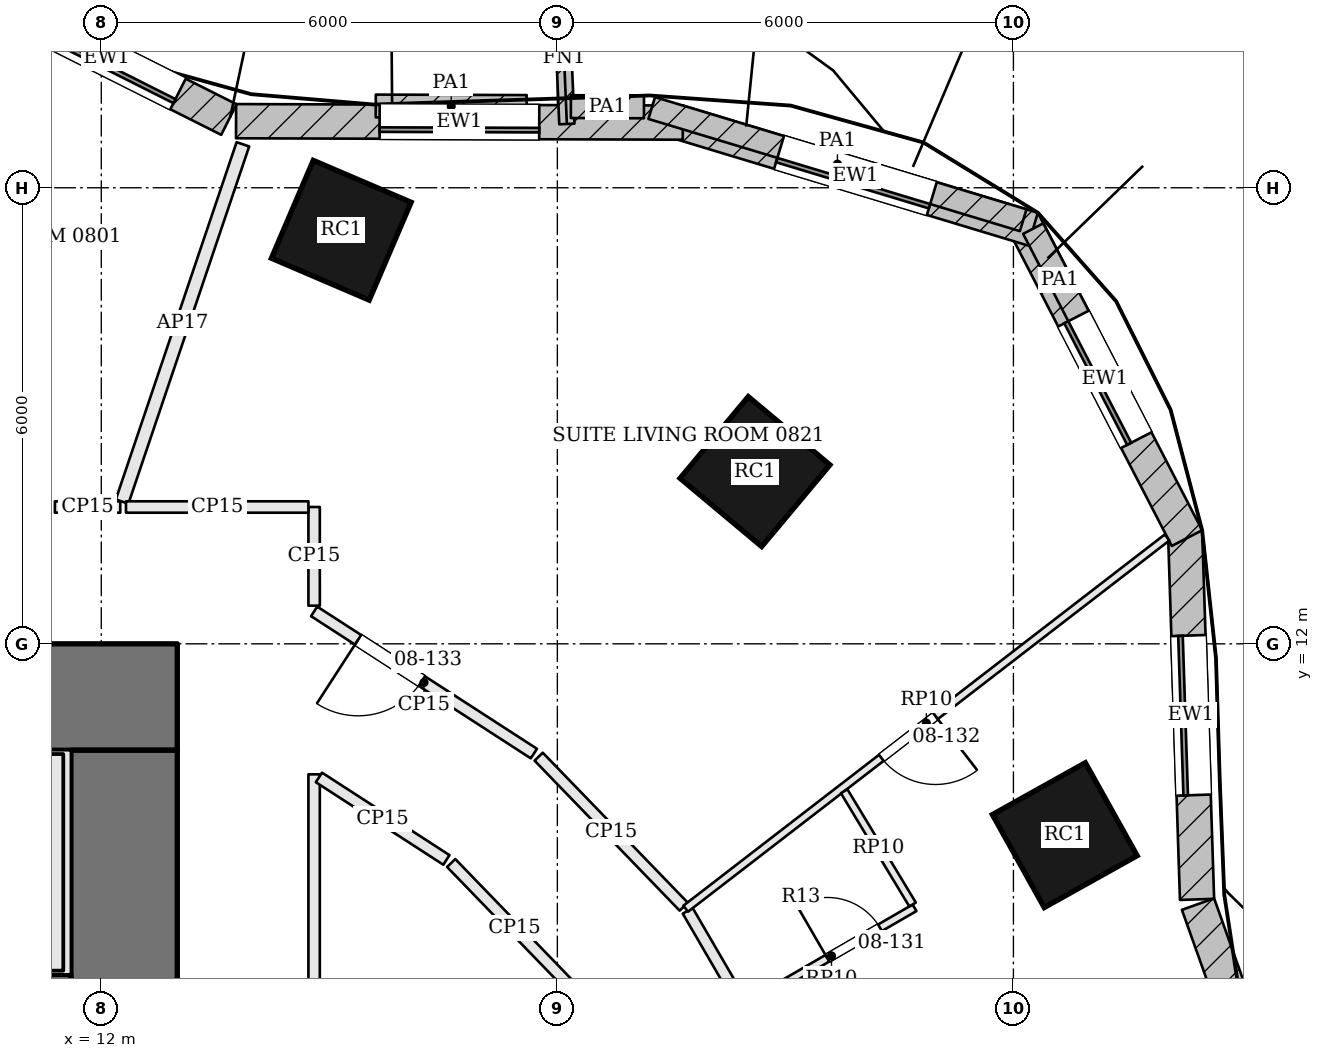
"""IFC4 building model, lengths in metres.
Left out: names, types, materials, properties, quantities, classifications, styles, units other than length and angle.
Written with IfcOpenShell. Run it as: python <this file> out.ifc"""

import sys

from ifc_helpers import new_model, si_unit, direction, frame, frame_2d, origin, origin_2d, place, context, subcontext, project, spatial, rectangle, extrude, element, fill, save


model = new_model("IFC4")
c1 = context("Model", 3, precision=1e-05, world=origin(), true_north=direction((0.0, 1.0)))
c2 = subcontext(c1, "Body", "Model", "MODEL_VIEW")
j1 = project(units=[si_unit("LENGTHUNIT", "METRE"), si_unit("PLANEANGLEUNIT", "RADIAN")], contexts=[c1])
p1 = place(None, origin())
s1 = spatial("IfcSite", under=j1, at=p1, CompositionType="ELEMENT")
p2 = place(p1, origin())
s2 = spatial("IfcBuilding", under=s1, at=p2, CompositionType="ELEMENT")
p3 = place(p2, frame((0.0, 0.0, 44.7)))
s3 = spatial("IfcBuildingStorey", under=s2, at=p3, CompositionType="ELEMENT", Elevation=44.7)
p4 = place(p3, frame((-13.0, 11.3, 0.0), z_axis=(0.0, 0.0, 1.0), x_axis=(1.0, 0.0, 0.0)))
e1 = element("IfcWall", 1, at=p4, inside=s3, PredefinedType="SHEAR", context=c2, shape_type="SweptSolid", body=[
    extrude(rectangle(XDim=26.0, YDim=1.4, at=frame_2d((13.0, 0.0))), origin(), (0.0, 0.0, 1.0), 3.6),
])
p5 = place(p4, frame((8.825, 0.0, 0.0)))
e2 = element("IfcOpeningElement", 2, at=p5, cuts=e1, PredefinedType="OPENING", context=c2, shape_type="SweptSolid", body=[
    extrude(rectangle(XDim=1.0, YDim=2.1, at=frame_2d((0.5, 1.05))), frame((0.0, 0.71, 0.0), z_axis=(0.0, -1.0, 0.0), x_axis=(1.0, 0.0, 0.0)), (0.0, 0.0, 1.0), 1.42),
])
p6 = place(p4, frame((11.275, 0.0, 0.0)))
e3 = element("IfcOpeningElement", 3, at=p6, cuts=e1, PredefinedType="OPENING", context=c2, shape_type="SweptSolid", body=[
    extrude(rectangle(XDim=1.0, YDim=2.1, at=frame_2d((0.5, 1.05))), frame((0.0, 0.71, 0.0), z_axis=(0.0, -1.0, 0.0), x_axis=(1.0, 0.0, 0.0)), (0.0, 0.0, 1.0), 1.42),
])
p7 = place(p4, frame((14.125, 0.0, 0.0)))
e4 = element("IfcOpeningElement", 4, at=p7, cuts=e1, PredefinedType="OPENING", context=c2, shape_type="SweptSolid", body=[
    extrude(rectangle(XDim=1.0, YDim=2.1, at=frame_2d((0.5, 1.05))), frame((0.0, 0.71, 0.0), z_axis=(0.0, -1.0, 0.0), x_axis=(1.0, 0.0, 0.0)), (0.0, 0.0, 1.0), 1.42),
])
p8 = place(p4, frame((16.725, 0.0, 0.0)))
e5 = element("IfcOpeningElement", 5, at=p8, cuts=e1, PredefinedType="OPENING", context=c2, shape_type="SweptSolid", body=[
    extrude(rectangle(XDim=0.7, YDim=2.1, at=frame_2d((0.35, 1.05))), frame((0.0, 0.71, 0.0), z_axis=(0.0, -1.0, 0.0), x_axis=(1.0, 0.0, 0.0)), (0.0, 0.0, 1.0), 1.42),
])
p9 = place(p3, frame((12.3, -1.6, 0.0), z_axis=(0.0, 0.0, 1.0), x_axis=(0.0, 1.0, 0.0)))
e6 = element("IfcWall", 6, at=p9, inside=s3, PredefinedType="SHEAR", context=c2, shape_type="SweptSolid", body=[
    extrude(rectangle(XDim=12.2, YDim=1.4, at=frame_2d((6.1, 0.0))), origin(), (0.0, 0.0, 1.0), 3.6),
])
p10 = place(p9, frame((6.8, 0.0, 0.0)))
e7 = element("IfcOpeningElement", 7, at=p10, cuts=e6, PredefinedType="OPENING", context=c2, shape_type="SweptSolid", body=[
    extrude(rectangle(XDim=1.8, YDim=2.1, at=frame_2d((0.9, 1.05))), frame((0.0, 0.71, 0.0), z_axis=(0.0, -1.0, 0.0), x_axis=(1.0, 0.0, 0.0)), (0.0, 0.0, 1.0), 1.42),
])
for number, where, z_axis, x_axis in (
    (8, (24.676, 9.483, 0.0), (0.0, 0.0, 1.0), (-0.487, 0.873, 0.0)),
    (9, (20.6, 14.266, 0.0), (0.0, 0.0, 1.0), (-0.767, 0.641, 0.0)),
    (10, (15.157, 17.441, 0.0), (0.0, 0.0, 1.0), (-0.919, 0.394, 0.0)),
):
    element("IfcColumn", number, at=place(p3, frame(where, z_axis=z_axis, x_axis=x_axis)), inside=s3, PredefinedType="COLUMN", context=c2, shape_type="SweptSolid", body=[
        extrude(rectangle(XDim=1.4, YDim=1.4, at=origin_2d()), origin(), (0.0, 0.0, 1.0), 3.6),
    ])
p11 = place(p3, frame((27.933, 4.356, 0.0), z_axis=(0.0, 0.0, 1.0), x_axis=(-0.335746005454, 0.941952557097, 0.0)))
e11 = element("IfcWall", 11, at=p11, inside=s3, PredefinedType="SOLIDWALL", context=c2, shape_type="SweptSolid", body=[
    extrude(rectangle(XDim=4.48, YDim=0.45, at=frame_2d((2.24, 0.0))), origin(), (0.0, 0.0, 1.0), 3.4),
])
p12 = place(p11, frame((1.19, 0.0, 0.9)))
e12 = element("IfcOpeningElement", 12, at=p12, cuts=e11, PredefinedType="OPENING", context=c2, shape_type="SweptSolid", body=[
    extrude(rectangle(XDim=2.1, YDim=2.0, at=frame_2d((1.05, 1.0))), frame((0.0, 0.235, 0.0), z_axis=(0.0, -1.0, 0.0), x_axis=(1.0, 0.0, 0.0)), (0.0, 0.0, 1.0), 0.47),
])
p13 = place(p3, frame((26.416, 8.638, 0.0), z_axis=(0.0, 0.0, 1.0), x_axis=(-0.03254979302, 0.999470115098, 0.0)))
e13 = element("IfcWall", 13, at=p13, inside=s3, PredefinedType="SOLIDWALL", context=c2, shape_type="SweptSolid", body=[
    extrude(rectangle(XDim=4.845, YDim=0.45, at=frame_2d((2.423, 0.0))), origin(), (0.0, 0.0, 1.0), 3.4),
])
p14 = place(p13, frame((1.373, 0.0, 0.9)))
e14 = element("IfcOpeningElement", 14, at=p14, cuts=e13, PredefinedType="OPENING", context=c2, shape_type="SweptSolid", body=[
    extrude(rectangle(XDim=2.1, YDim=2.0, at=frame_2d((1.05, 1.0))), frame((0.0, 0.235, 0.0), z_axis=(0.0, -1.0, 0.0), x_axis=(1.0, 0.0, 0.0)), (0.0, 0.0, 1.0), 0.47),
])
p15 = place(p3, frame((26.283, 13.391, 0.0), z_axis=(0.0, 0.0, 1.0), x_axis=(-0.459485057932, 0.888185499509, 0.0)))
e15 = element("IfcWall", 15, at=p15, inside=s3, PredefinedType="SOLIDWALL", context=c2, shape_type="SweptSolid", body=[
    extrude(rectangle(XDim=4.703, YDim=0.45, at=frame_2d((2.352, 0.0))), origin(), (0.0, 0.0, 1.0), 3.4),
])
p16 = place(p15, frame((1.451, 0.0, 0.9)))
e16 = element("IfcOpeningElement", 16, at=p16, cuts=e15, PredefinedType="OPENING", context=c2, shape_type="SweptSolid", body=[
    extrude(rectangle(XDim=1.8, YDim=2.0, at=frame_2d((0.9, 1.0))), frame((0.0, 0.235, 0.0), z_axis=(0.0, -1.0, 0.0), x_axis=(1.0, 0.0, 0.0)), (0.0, 0.0, 1.0), 0.47),
])
p17 = place(p3, frame((24.257, 17.456, 0.0), z_axis=(0.0, 0.0, 1.0), x_axis=(-0.957268138294, 0.289201852359, 0.0)))
e17 = element("IfcWall", 17, at=p17, inside=s3, PredefinedType="SOLIDWALL", context=c2, shape_type="SweptSolid", body=[
    extrude(rectangle(XDim=4.879, YDim=0.45, at=frame_2d((2.44, 0.0))), origin(), (0.0, 0.0, 1.0), 3.4),
])
p18 = place(p17, frame((1.39, 0.0, 0.9)))
e18 = element("IfcOpeningElement", 18, at=p18, cuts=e17, PredefinedType="OPENING", context=c2, shape_type="SweptSolid", body=[
    extrude(rectangle(XDim=2.1, YDim=2.0, at=frame_2d((1.05, 1.0))), frame((0.0, 0.235, 0.0), z_axis=(0.0, -1.0, 0.0), x_axis=(1.0, 0.0, 0.0)), (0.0, 0.0, 1.0), 0.47),
])
p19 = place(p3, frame((19.65, 18.857, 0.0), z_axis=(0.0, 0.0, 1.0), x_axis=(-0.999994750773, 0.003240127552, 0.0)))
e19 = element("IfcWall", 19, at=p19, inside=s3, PredefinedType="SOLIDWALL", context=c2, shape_type="SweptSolid", body=[
    extrude(rectangle(XDim=5.877, YDim=0.45, at=frame_2d((2.938, 0.0))), origin(), (0.0, 0.0, 1.0), 3.4),
])
p20 = place(p19, frame((1.889, 0.0, 0.9)))
e20 = element("IfcOpeningElement", 20, at=p20, cuts=e19, PredefinedType="OPENING", context=c2, shape_type="SweptSolid", body=[
    extrude(rectangle(XDim=2.1, YDim=2.0, at=frame_2d((1.05, 1.0))), frame((0.0, 0.235, 0.0), z_axis=(0.0, -1.0, 0.0), x_axis=(1.0, 0.0, 0.0)), (0.0, 0.0, 1.0), 0.47),
])
p21 = place(p3, frame((13.679, 18.897, 0.0), z_axis=(0.0, 0.0, 1.0), x_axis=(-0.893502471356, 0.449058274259, 0.0)))
e21 = element("IfcWall", 21, at=p21, inside=s3, PredefinedType="SOLIDWALL", context=c2, shape_type="SweptSolid", body=[
    extrude(rectangle(XDim=3.598, YDim=0.45, at=frame_2d((1.799, 0.0))), origin(), (0.0, 0.0, 1.0), 3.4),
])
p22 = place(p21, frame((0.749, 0.0, 0.9)))
e22 = element("IfcOpeningElement", 22, at=p22, cuts=e21, PredefinedType="OPENING", context=c2, shape_type="SweptSolid", body=[
    extrude(rectangle(XDim=2.1, YDim=2.0, at=frame_2d((1.05, 1.0))), frame((0.0, 0.235, 0.0), z_axis=(0.0, -1.0, 0.0), x_axis=(1.0, 0.0, 0.0)), (0.0, 0.0, 1.0), 0.47),
])
p23 = place(p3, frame((18.125, 18.839, 0.0), z_axis=(0.0, 0.0, 1.0), x_axis=(-0.042274699855, 0.999106025281, 0.0)))
e23 = element("IfcWall", 23, at=p23, inside=s3, PredefinedType="SOLIDWALL", context=c2, shape_type="SweptSolid", body=[
    extrude(rectangle(XDim=1.75, YDim=0.2, at=frame_2d((0.875, 0.0))), origin(), (0.0, 0.0, 1.0), 3.4),
])
p24 = place(p3, frame((24.965, 16.101, 3.6), z_axis=(0.0, 0.0, 1.0), x_axis=(-0.459461897951, 0.88819748048, 0.0)))
e24 = element("IfcWall", 24, at=p24, inside=s3, PredefinedType="PARAPET", context=c2, shape_type="SweptSolid", body=[
    extrude(rectangle(XDim=1.533, YDim=0.3, at=frame_2d((0.767, 0.0))), origin(), (0.0, 0.0, 1.0), 1.1),
])
p25 = place(p3, frame((24.128, 17.573, 3.6), z_axis=(0.0, 0.0, 1.0), x_axis=(-0.95727702005, 0.289172451806, 0.0)))
e25 = element("IfcWall", 25, at=p25, inside=s3, PredefinedType="PARAPET", context=c2, shape_type="SweptSolid", body=[
    extrude(rectangle(XDim=5.105, YDim=0.3, at=frame_2d((2.553, 0.0))), origin(), (0.0, 0.0, 1.0), 1.1),
])
p26 = place(p3, frame((19.14, 19.064, 3.6), z_axis=(0.0, 0.0, 1.0), x_axis=(-0.999994556719, 0.003299474426, 0.0)))
e26 = element("IfcWall", 26, at=p26, inside=s3, PredefinedType="PARAPET", context=c2, shape_type="SweptSolid", body=[
    extrude(rectangle(XDim=0.962, YDim=0.3, at=frame_2d((0.481, 0.0))), origin(), (0.0, 0.0, 1.0), 1.1),
])
p27 = place(p3, frame((17.596, 19.069, 3.6), z_axis=(0.0, 0.0, 1.0), x_axis=(-0.999994488127, 0.003320198128, 0.0)))
e27 = element("IfcWall", 27, at=p27, inside=s3, PredefinedType="PARAPET", context=c2, shape_type="SweptSolid", body=[
    extrude(rectangle(XDim=1.985, YDim=0.3, at=frame_2d((0.993, 0.0))), origin(), (0.0, 0.0, 1.0), 1.1),
])
p28 = place(p3, frame((11.6, 7.525, 0.0), z_axis=(0.0, 0.0, 1.0), x_axis=(-1.0, 0.0, 0.0)))
e28 = element("IfcWall", 28, at=p28, inside=s3, PredefinedType="SOLIDWALL", context=c2, shape_type="SweptSolid", body=[
    extrude(rectangle(XDim=6.5, YDim=0.25, at=frame_2d((3.25, 0.0))), origin(), (0.0, 0.0, 1.0), 3.4),
])
p29 = place(p28, frame((5.2, 0.0, 0.0)))
e29 = element("IfcOpeningElement", 29, at=p29, cuts=e28, PredefinedType="OPENING", context=c2, shape_type="SweptSolid", body=[
    extrude(rectangle(XDim=1.2, YDim=2.1, at=frame_2d((0.6, 1.05))), frame((0.0, 0.135, 0.0), z_axis=(0.0, -1.0, 0.0), x_axis=(1.0, 0.0, 0.0)), (0.0, 0.0, 1.0), 0.27),
])
p30 = place(p3, frame((12.25, 13.8, 0.0), z_axis=(0.0, 0.0, 1.0), x_axis=(-1.0, 0.0, 0.0)))
e30 = element("IfcWall", 30, at=p30, inside=s3, PredefinedType="PARTITIONING", context=c2, shape_type="SweptSolid", body=[
    extrude(rectangle(XDim=0.86, YDim=0.15, at=frame_2d((0.43, 0.0))), origin(), (0.0, 0.0, 1.0), 2.68),
])
p31 = place(p3, frame((13.863, 18.572, 0.0), z_axis=(0.0, 0.0, 1.0), x_axis=(-0.320254541028, -0.947331530643, 0.0)))
e31 = element("IfcWall", 31, at=p31, inside=s3, PredefinedType="PARTITIONING", context=c2, shape_type="SweptSolid", body=[
    extrude(rectangle(XDim=4.962, YDim=0.175, at=frame_2d((2.481, 0.0))), origin(), (0.0, 0.0, 1.0), 2.68),
])
p32 = place(p3, frame((21.043, 6.202, 0.0), z_axis=(0.0, 0.0, 1.0), x_axis=(-0.502371650135, 0.864651794158, 0.0)))
e32 = element("IfcWall", 32, at=p32, inside=s3, PredefinedType="PARTITIONING", context=c2, shape_type="SweptSolid", body=[
    extrude(rectangle(XDim=2.644, YDim=0.15, at=frame_2d((1.322, 0.0))), origin(), (0.0, 0.0, 1.0), 2.68),
])
p33 = place(p3, frame((19.663, 8.542, 0.0), z_axis=(0.0, 0.0, 1.0), x_axis=(-0.695225869021, 0.718791340407, 0.0)))
e33 = element("IfcWall", 33, at=p33, inside=s3, PredefinedType="PARTITIONING", context=c2, shape_type="SweptSolid", body=[
    extrude(rectangle(XDim=2.745, YDim=0.15, at=frame_2d((1.373, 0.0))), origin(), (0.0, 0.0, 1.0), 2.68),
])
p34 = place(p3, frame((17.691, 10.556, 0.0), z_axis=(0.0, 0.0, 1.0), x_axis=(-0.839564450265, 0.54326009779, 0.0)))
e34 = element("IfcWall", 34, at=p34, inside=s3, PredefinedType="PARTITIONING", context=c2, shape_type="SweptSolid", body=[
    extrude(rectangle(XDim=3.443, YDim=0.15, at=frame_2d((1.722, 0.0))), origin(), (0.0, 0.0, 1.0), 2.68),
])
p35 = place(p34, frame((1.755, 0.0, 0.0)))
e35 = element("IfcOpeningElement", 35, at=p35, cuts=e34, PredefinedType="OPENING", context=c2, shape_type="SweptSolid", body=[
    extrude(rectangle(XDim=1.0, YDim=2.1, at=frame_2d((0.5, 1.05))), frame((0.0, 0.085, 0.0), z_axis=(0.0, -1.0, 0.0), x_axis=(1.0, 0.0, 0.0)), (0.0, 0.0, 1.0), 0.17),
])
p36 = place(p3, frame((14.8, 12.502, 0.0), z_axis=(0.0, 0.0, 1.0), x_axis=(-0.000188040613, 0.99999998232, 0.0)))
e36 = element("IfcWall", 36, at=p36, inside=s3, PredefinedType="PARTITIONING", context=c2, shape_type="SweptSolid", body=[
    extrude(rectangle(XDim=1.298, YDim=0.15, at=frame_2d((0.649, 0.0))), origin(), (0.0, 0.0, 1.0), 2.68),
])
p37 = place(p3, frame((14.725, 13.8, 0.0), z_axis=(0.0, 0.0, 1.0), x_axis=(-1.0, 0.0, 0.0)))
e37 = element("IfcWall", 37, at=p37, inside=s3, PredefinedType="PARTITIONING", context=c2, shape_type="SweptSolid", body=[
    extrude(rectangle(XDim=2.4, YDim=0.15, at=frame_2d((1.2, 0.0))), origin(), (0.0, 0.0, 1.0), 2.68),
])
p38 = place(p3, frame((16.604, 9.116, 0.0), z_axis=(0.0, 0.0, 1.0), x_axis=(0.695185405932, -0.718830474716, 0.0)))
e38 = element("IfcWall", 38, at=p38, inside=s3, PredefinedType="PARTITIONING", context=c2, shape_type="SweptSolid", body=[
    extrude(rectangle(XDim=2.396, YDim=0.15, at=frame_2d((1.198, 0.0))), origin(), (0.0, 0.0, 1.0), 2.68),
])
p39 = place(p3, frame((14.8, -4.725, 0.0), z_axis=(0.0, 0.0, 1.0), x_axis=(0.0, 1.0, 0.0)))
e39 = element("IfcWall", 39, at=p39, inside=s3, PredefinedType="PARTITIONING", context=c2, shape_type="SweptSolid", body=[
    extrude(rectangle(XDim=15.008, YDim=0.15, at=frame_2d((7.504, 0.0))), origin(), (0.0, 0.0, 1.0), 2.68),
])
p40 = place(p39, frame((11.516, 0.0, 0.0)))
e40 = element("IfcOpeningElement", 40, at=p40, cuts=e39, PredefinedType="OPENING", context=c2, shape_type="SweptSolid", body=[
    extrude(rectangle(XDim=0.7, YDim=2.1, at=frame_2d((0.35, 1.05))), frame((0.0, 0.085, 0.0), z_axis=(0.0, -1.0, 0.0), x_axis=(1.0, 0.0, 0.0)), (0.0, 0.0, 1.0), 0.17),
])
p41 = place(p39, frame((4.225, 0.0, 0.0)))
e41 = element("IfcOpeningElement", 41, at=p41, cuts=e39, PredefinedType="OPENING", context=c2, shape_type="SweptSolid", body=[
    extrude(rectangle(XDim=1.0, YDim=2.1, at=frame_2d((0.5, 1.05))), frame((0.0, 0.085, 0.0), z_axis=(0.0, -1.0, 0.0), x_axis=(1.0, 0.0, 0.0)), (0.0, 0.0, 1.0), 0.17),
])
p42 = place(p3, frame((14.863, 10.242, 0.0), z_axis=(0.0, 0.0, 1.0), x_axis=(0.839530811724, -0.543312079901, 0.0)))
e42 = element("IfcWall", 42, at=p42, inside=s3, PredefinedType="PARTITIONING", context=c2, shape_type="SweptSolid", body=[
    extrude(rectangle(XDim=1.998, YDim=0.15, at=frame_2d((0.999, 0.0))), origin(), (0.0, 0.0, 1.0), 2.68),
])
p43 = place(p3, frame((26.021, 13.398, 0.0), z_axis=(0.0, 0.0, 1.0), x_axis=(-0.791905002939, -0.610644304256, 0.0)))
e43 = element("IfcWall", 43, at=p43, inside=s3, PredefinedType="PARTITIONING", context=c2, shape_type="SweptSolid", body=[
    extrude(rectangle(XDim=7.997, YDim=0.1, at=frame_2d((3.998, 0.0))), origin(), (0.0, 0.0, 1.0), 2.68),
])
p44 = place(p43, frame((3.847, 0.0, 0.0)))
e44 = element("IfcOpeningElement", 44, at=p44, cuts=e43, PredefinedType="OPENING", context=c2, shape_type="SweptSolid", body=[
    extrude(rectangle(XDim=0.9, YDim=2.4, at=frame_2d((0.45, 1.2))), frame((0.0, 0.06, 0.0), z_axis=(0.0, -1.0, 0.0), x_axis=(1.0, 0.0, 0.0)), (0.0, 0.0, 1.0), 0.12),
])
p45 = place(p3, frame((20.514, 7.261, 0.0), z_axis=(0.0, 0.0, 1.0), x_axis=(0.865216596083, 0.501398286656, 0.0)))
e45 = element("IfcWall", 45, at=p45, inside=s3, PredefinedType="PARTITIONING", context=c2, shape_type="SweptSolid", body=[
    extrude(rectangle(XDim=2.525, YDim=0.1, at=frame_2d((1.263, 0.0))), origin(), (0.0, 0.0, 1.0), 2.68),
])
p46 = place(p45, frame((1.2, 0.0, 0.0)))
e46 = element("IfcOpeningElement", 46, at=p46, cuts=e45, PredefinedType="OPENING", context=c2, shape_type="SweptSolid", body=[
    extrude(rectangle(XDim=0.8, YDim=2.1, at=frame_2d((0.4, 1.05))), frame((0.0, 0.06, 0.0), z_axis=(0.0, -1.0, 0.0), x_axis=(1.0, 0.0, 0.0)), (0.0, 0.0, 1.0), 0.12),
])
p47 = place(p3, frame((22.673, 8.57, 0.0), z_axis=(0.0, 0.0, 1.0), x_axis=(-0.516989335604, 0.855991838087, 0.0)))
e47 = element("IfcWall", 47, at=p47, inside=s3, PredefinedType="PARTITIONING", context=c2, shape_type="SweptSolid", body=[
    extrude(rectangle(XDim=1.741, YDim=0.1, at=frame_2d((0.87, 0.0))), origin(), (0.0, 0.0, 1.0), 2.68),
])
p48 = place(p14, origin())
e48 = element("IfcWindow", 48, at=p48, inside=s3, PartitioningType="SINGLE_PANEL", PredefinedType="WINDOW", context=c2, shape_type="SweptSolid", body=[
    extrude(rectangle(XDim=2.1, YDim=2.0, at=frame_2d((1.05, 1.0))), frame((0.0, 0.135, 0.0), z_axis=(0.0, -1.0, 0.0), x_axis=(1.0, 0.0, 0.0)), (0.0, 0.0, 1.0), 0.06),
])
fill(e14, e48)
p49 = place(p16, origin())
e49 = element("IfcWindow", 49, at=p49, inside=s3, PartitioningType="SINGLE_PANEL", PredefinedType="WINDOW", context=c2, shape_type="SweptSolid", body=[
    extrude(rectangle(XDim=1.8, YDim=2.0, at=frame_2d((0.9, 1.0))), frame((0.0, 0.135, 0.0), z_axis=(0.0, -1.0, 0.0), x_axis=(1.0, 0.0, 0.0)), (0.0, 0.0, 1.0), 0.06),
])
fill(e16, e49)
p50 = place(p18, origin())
e50 = element("IfcWindow", 50, at=p50, inside=s3, PartitioningType="SINGLE_PANEL", PredefinedType="WINDOW", context=c2, shape_type="SweptSolid", body=[
    extrude(rectangle(XDim=2.1, YDim=2.0, at=frame_2d((1.05, 1.0))), frame((0.0, 0.135, 0.0), z_axis=(0.0, -1.0, 0.0), x_axis=(1.0, 0.0, 0.0)), (0.0, 0.0, 1.0), 0.06),
])
fill(e18, e50)
p51 = place(p20, origin())
e51 = element("IfcWindow", 51, at=p51, inside=s3, PartitioningType="SINGLE_PANEL", PredefinedType="WINDOW", context=c2, shape_type="SweptSolid", body=[
    extrude(rectangle(XDim=2.1, YDim=2.0, at=frame_2d((1.05, 1.0))), frame((0.0, 0.135, 0.0), z_axis=(0.0, -1.0, 0.0), x_axis=(1.0, 0.0, 0.0)), (0.0, 0.0, 1.0), 0.06),
])
fill(e20, e51)
p52 = place(p22, origin())
e52 = element("IfcWindow", 52, at=p52, inside=s3, PartitioningType="SINGLE_PANEL", PredefinedType="WINDOW", context=c2, shape_type="SweptSolid", body=[
    extrude(rectangle(XDim=2.1, YDim=2.0, at=frame_2d((1.05, 1.0))), frame((0.0, 0.135, 0.0), z_axis=(0.0, -1.0, 0.0), x_axis=(1.0, 0.0, 0.0)), (0.0, 0.0, 1.0), 0.06),
])
fill(e22, e52)
p53 = place(p46, origin())
e53 = element("IfcDoor", 53, at=p53, inside=s3, OperationType="SINGLE_SWING_LEFT", PredefinedType="DOOR", context=c2, shape_type="SweptSolid", body=[
    extrude(rectangle(XDim=0.8, YDim=2.1, at=frame_2d((0.4, 1.05))), frame((0.0, 0.025, 0.0), z_axis=(0.0, -1.0, 0.0), x_axis=(1.0, 0.0, 0.0)), (0.0, 0.0, 1.0), 0.05),
])
fill(e46, e53)
p54 = place(p44, origin())
e54 = element("IfcDoor", 54, at=p54, inside=s3, OperationType="SINGLE_SWING_LEFT", PredefinedType="DOOR", context=c2, shape_type="SweptSolid", body=[
    extrude(rectangle(XDim=0.9, YDim=2.4, at=frame_2d((0.45, 1.2))), frame((0.0, 0.025, 0.0), z_axis=(0.0, -1.0, 0.0), x_axis=(1.0, 0.0, 0.0)), (0.0, 0.0, 1.0), 0.05),
])
fill(e44, e54)
p55 = place(p35, origin())
e55 = element("IfcDoor", 55, at=p55, inside=s3, OperationType="SINGLE_SWING_RIGHT", PredefinedType="DOOR", context=c2, shape_type="SweptSolid", body=[
    extrude(rectangle(XDim=1.0, YDim=2.1, at=frame_2d((0.5, 1.05))), frame((0.0, 0.025, 0.0), z_axis=(0.0, -1.0, 0.0), x_axis=(1.0, 0.0, 0.0)), (0.0, 0.0, 1.0), 0.05),
])
fill(e35, e55)
save(model, sys.argv[1])
